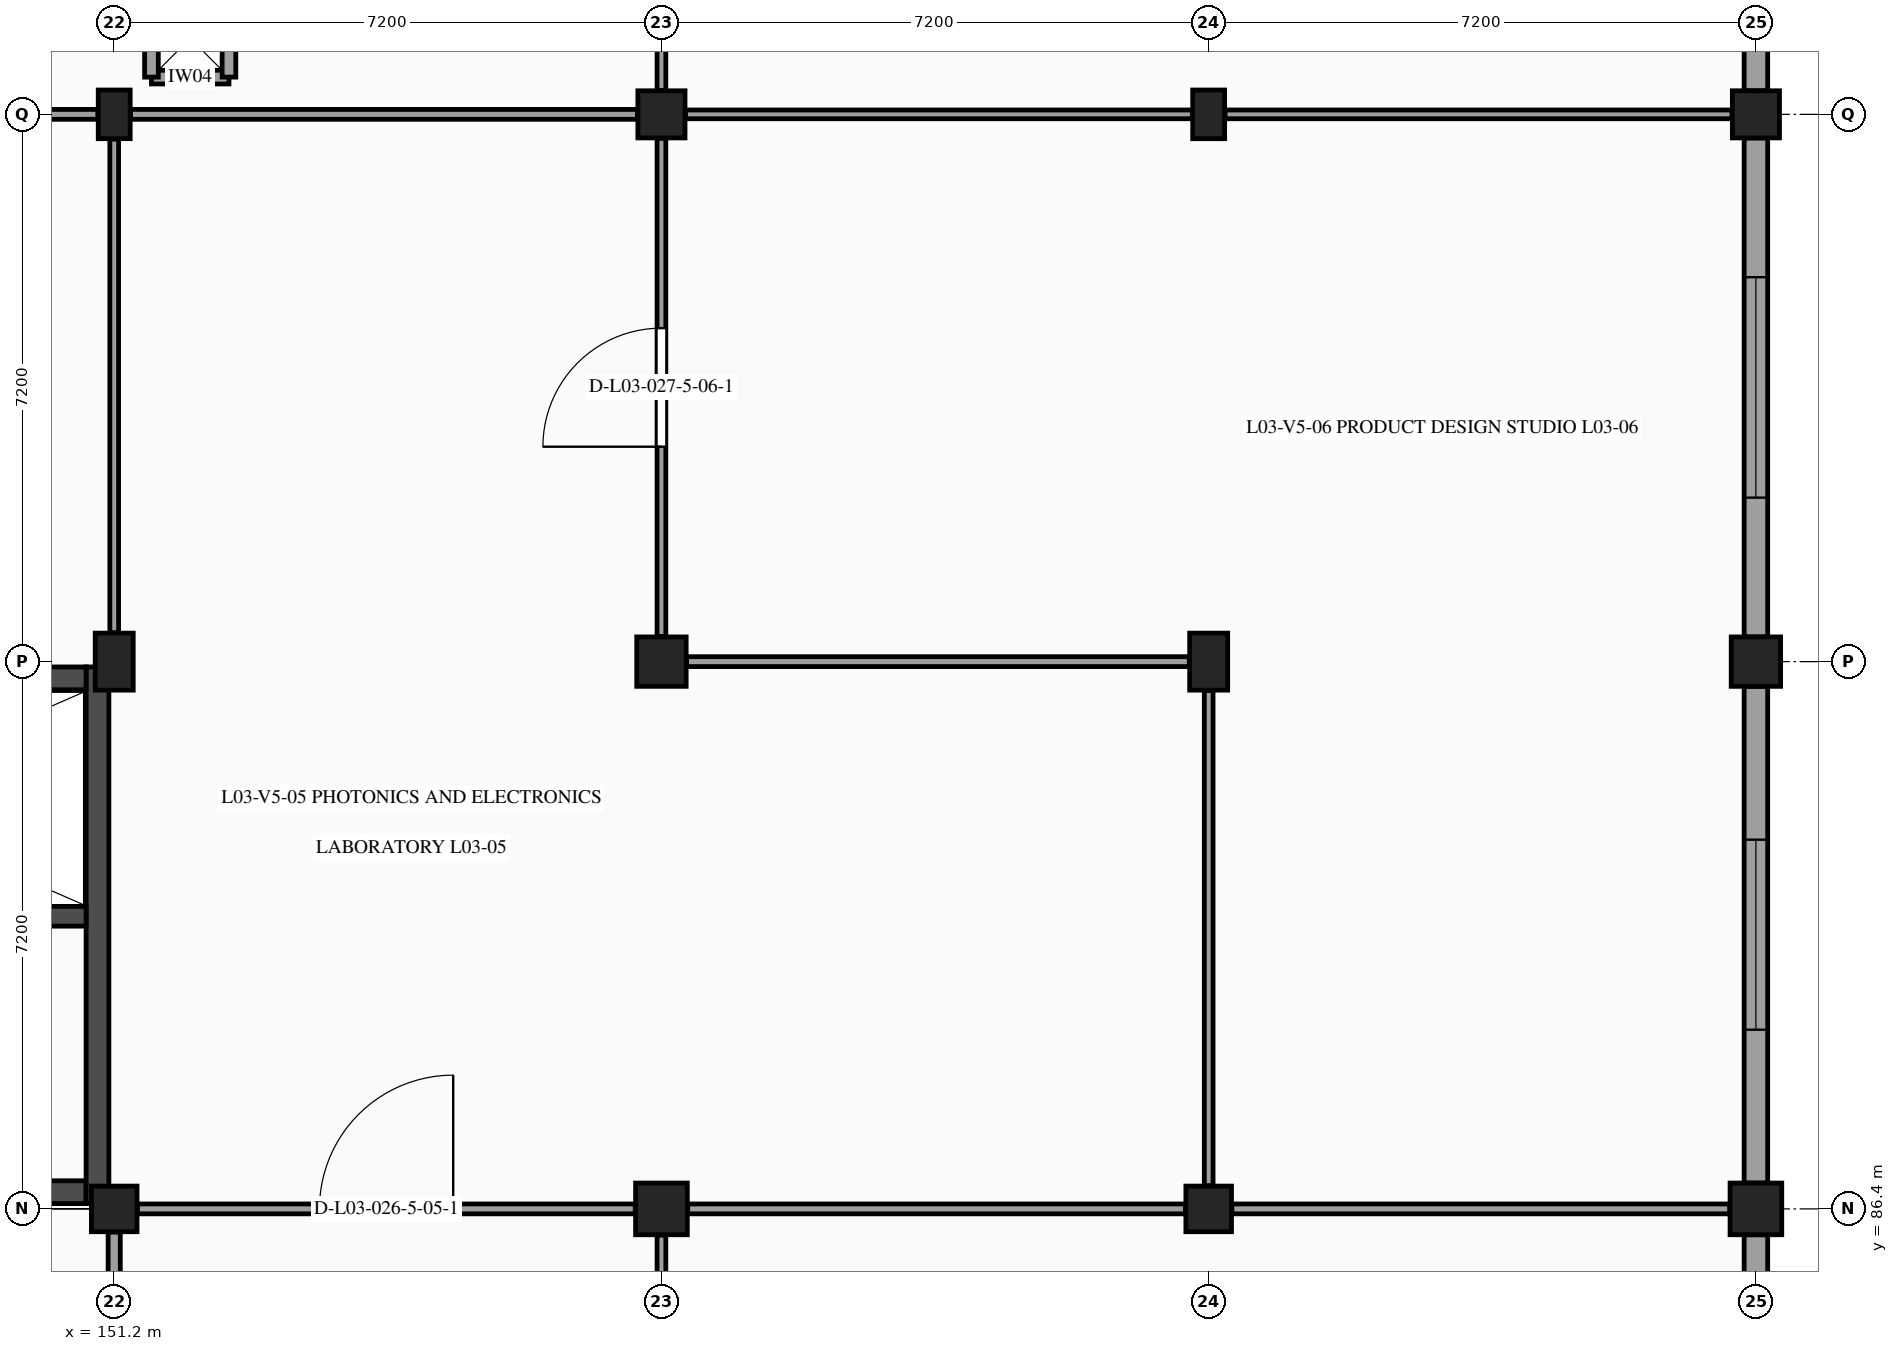
"""IFC4 building model, lengths in metres.
Left out: names, types, materials, properties, quantities, classifications, styles, units other than length and angle.
Written with IfcOpenShell. Run it as: python <this file> out.ifc"""

import sys

from ifc_helpers import new_model, si_unit, direction, frame, frame_2d, origin, origin_2d, place, context, subcontext, project, spatial, rectangle, extrude, element, fill, save


model = new_model("IFC4")
c1 = context("Model", 3, precision=1e-05, world=origin(), true_north=direction((0.0, 1.0)))
c2 = subcontext(c1, "Body", "Model", "MODEL_VIEW")
j1 = project(units=[si_unit("LENGTHUNIT", "METRE"), si_unit("PLANEANGLEUNIT", "RADIAN")], contexts=[c1])
p1 = place(None, origin())
s1 = spatial("IfcSite", under=j1, at=p1, CompositionType="ELEMENT")
p2 = place(p1, origin())
s2 = spatial("IfcBuilding", under=s1, at=p2, CompositionType="ELEMENT")
p3 = place(p2, frame((0.0, 0.0, 14.4)))
s3 = spatial("IfcBuildingStorey", under=s2, at=p3, CompositionType="ELEMENT", Elevation=14.4)
p4 = place(p3, frame((151.2, 86.4, 0.0), z_axis=(0.0, 0.0, 1.0), x_axis=(1.0, 0.0, 0.0)))
e1 = element("IfcColumn", 1, at=p4, inside=s3, PredefinedType="COLUMN", context=c2, shape_type="SweptSolid", body=[
    extrude(rectangle(XDim=0.6, YDim=0.6, at=origin_2d()), origin(), (0.0, 0.0, 1.0), 4.2),
])
p5 = place(p3, frame((151.2, 93.6, 0.0), z_axis=(0.0, 0.0, 1.0), x_axis=(1.0, 0.0, 0.0)))
e2 = element("IfcColumn", 2, at=p5, inside=s3, PredefinedType="COLUMN", context=c2, shape_type="SweptSolid", body=[
    extrude(rectangle(XDim=0.5, YDim=0.75, at=origin_2d()), origin(), (0.0, 0.0, 1.0), 4.2),
])
p6 = place(p3, frame((151.2, 100.8, 0.0), z_axis=(0.0, 0.0, 1.0), x_axis=(1.0, 0.0, 0.0)))
e3 = element("IfcColumn", 3, at=p6, inside=s3, PredefinedType="PILASTER", context=c2, shape_type="SweptSolid", body=[
    extrude(rectangle(XDim=0.42, YDim=0.64, at=origin_2d()), origin(), (0.0, 0.0, 1.0), 4.2),
])
p7 = place(p3, frame((158.4, 86.4, 0.0), z_axis=(0.0, 0.0, 1.0), x_axis=(1.0, 0.0, 0.0)))
e4 = element("IfcColumn", 4, at=p7, inside=s3, PredefinedType="COLUMN", context=c2, shape_type="SweptSolid", body=[
    extrude(rectangle(XDim=0.68, YDim=0.68, at=origin_2d()), origin(), (0.0, 0.0, 1.0), 4.2),
])
p8 = place(p3, frame((158.4, 93.6, 0.0), z_axis=(0.0, 0.0, 1.0), x_axis=(1.0, 0.0, 0.0)))
e5 = element("IfcColumn", 5, at=p8, inside=s3, PredefinedType="COLUMN", context=c2, shape_type="SweptSolid", body=[
    extrude(rectangle(XDim=0.65, YDim=0.65, at=origin_2d()), origin(), (0.0, 0.0, 1.0), 4.2),
])
p9 = place(p3, frame((158.4, 100.8, 0.0), z_axis=(0.0, 0.0, 1.0), x_axis=(1.0, 0.0, 0.0)))
e6 = element("IfcColumn", 6, at=p9, inside=s3, PredefinedType="COLUMN", context=c2, shape_type="SweptSolid", body=[
    extrude(rectangle(XDim=0.62, YDim=0.62, at=origin_2d()), origin(), (0.0, 0.0, 1.0), 4.2),
])
p10 = place(p3, frame((165.6, 86.4, 0.0), z_axis=(0.0, 0.0, 1.0), x_axis=(1.0, 0.0, 0.0)))
e7 = element("IfcColumn", 7, at=p10, inside=s3, PredefinedType="COLUMN", context=c2, shape_type="SweptSolid", body=[
    extrude(rectangle(XDim=0.6, YDim=0.6, at=origin_2d()), origin(), (0.0, 0.0, 1.0), 4.2),
])
p11 = place(p3, frame((165.6, 93.6, 0.0), z_axis=(0.0, 0.0, 1.0), x_axis=(1.0, 0.0, 0.0)))
e8 = element("IfcColumn", 8, at=p11, inside=s3, PredefinedType="COLUMN", context=c2, shape_type="SweptSolid", body=[
    extrude(rectangle(XDim=0.5, YDim=0.75, at=origin_2d()), origin(), (0.0, 0.0, 1.0), 4.2),
])
p12 = place(p3, frame((165.6, 100.8, 0.0), z_axis=(0.0, 0.0, 1.0), x_axis=(1.0, 0.0, 0.0)))
e9 = element("IfcColumn", 9, at=p12, inside=s3, PredefinedType="PILASTER", context=c2, shape_type="SweptSolid", body=[
    extrude(rectangle(XDim=0.42, YDim=0.64, at=origin_2d()), origin(), (0.0, 0.0, 1.0), 4.2),
])
p13 = place(p3, frame((172.8, 86.4, 0.0), z_axis=(0.0, 0.0, 1.0), x_axis=(1.0, 0.0, 0.0)))
e10 = element("IfcColumn", 10, at=p13, inside=s3, PredefinedType="COLUMN", context=c2, shape_type="SweptSolid", body=[
    extrude(rectangle(XDim=0.68, YDim=0.68, at=origin_2d()), origin(), (0.0, 0.0, 1.0), 4.2),
])
p14 = place(p3, frame((172.8, 93.6, 0.0), z_axis=(0.0, 0.0, 1.0), x_axis=(1.0, 0.0, 0.0)))
e11 = element("IfcColumn", 11, at=p14, inside=s3, PredefinedType="COLUMN", context=c2, shape_type="SweptSolid", body=[
    extrude(rectangle(XDim=0.65, YDim=0.65, at=origin_2d()), origin(), (0.0, 0.0, 1.0), 4.2),
])
p15 = place(p3, frame((172.8, 100.8, 0.0), z_axis=(0.0, 0.0, 1.0), x_axis=(1.0, 0.0, 0.0)))
e12 = element("IfcColumn", 12, at=p15, inside=s3, PredefinedType="COLUMN", context=c2, shape_type="SweptSolid", body=[
    extrude(rectangle(XDim=0.62, YDim=0.62, at=origin_2d()), origin(), (0.0, 0.0, 1.0), 4.2),
])
p16 = place(p3, frame((172.8, 107.7, 0.0), z_axis=(0.0, 0.0, 1.0), x_axis=(0.0, -1.0, 0.0)))
e13 = element("IfcWall", 13, at=p16, inside=s3, PredefinedType="STANDARD", context=c2, shape_type="SweptSolid", body=[
    extrude(rectangle(XDim=6.59, YDim=0.31, at=frame_2d((3.295, 0.0))), origin(), (0.0, 0.0, 1.0), 3.135),
])
p17 = place(p16, frame((1.395, 0.0, 0.98)))
e14 = element("IfcOpeningElement", 14, at=p17, cuts=e13, PredefinedType="OPENING", context=c2, shape_type="SweptSolid", body=[
    extrude(rectangle(XDim=3.8, YDim=1.6, at=frame_2d((1.9, 0.8))), frame((0.0, 0.165, 0.0), z_axis=(0.0, -1.0, 0.0), x_axis=(1.0, 0.0, 0.0)), (0.0, 0.0, 1.0), 0.33),
])
p18 = place(p3, frame((172.8, 100.49, 0.0), z_axis=(0.0, 0.0, 1.0), x_axis=(0.0, -1.0, 0.0)))
e15 = element("IfcWall", 15, at=p18, inside=s3, PredefinedType="STANDARD", context=c2, shape_type="SweptSolid", body=[
    extrude(rectangle(XDim=6.565, YDim=0.31, at=frame_2d((3.282, 0.0))), origin(), (0.0, 0.0, 1.0), 3.135),
])
p19 = place(p18, frame((1.833, 0.0, 0.98)))
e16 = element("IfcOpeningElement", 16, at=p19, cuts=e15, PredefinedType="OPENING", context=c2, shape_type="SweptSolid", body=[
    extrude(rectangle(XDim=2.9, YDim=1.6, at=frame_2d((1.45, 0.8))), frame((0.0, 0.165, 0.0), z_axis=(0.0, -1.0, 0.0), x_axis=(1.0, 0.0, 0.0)), (0.0, 0.0, 1.0), 0.33),
])
p20 = place(p3, frame((172.8, 93.275, 0.0), z_axis=(0.0, 0.0, 1.0), x_axis=(0.0, -1.0, 0.0)))
e17 = element("IfcWall", 17, at=p20, inside=s3, PredefinedType="STANDARD", context=c2, shape_type="SweptSolid", body=[
    extrude(rectangle(XDim=6.535, YDim=0.31, at=frame_2d((3.268, 0.0))), origin(), (0.0, 0.0, 1.0), 3.135),
])
p21 = place(p20, frame((2.018, 0.0, 0.98)))
e18 = element("IfcOpeningElement", 18, at=p21, cuts=e17, PredefinedType="OPENING", context=c2, shape_type="SweptSolid", body=[
    extrude(rectangle(XDim=2.5, YDim=1.35, at=frame_2d((1.25, 0.675))), frame((0.0, 0.165, 0.0), z_axis=(0.0, -1.0, 0.0), x_axis=(1.0, 0.0, 0.0)), (0.0, 0.0, 1.0), 0.33),
])
p22 = place(p3, frame((172.8, 86.06, 0.0), z_axis=(0.0, 0.0, 1.0), x_axis=(0.0, -1.0, 0.0)))
e19 = element("IfcWall", 19, at=p22, inside=s3, PredefinedType="STANDARD", context=c2, shape_type="SweptSolid", body=[
    extrude(rectangle(XDim=6.54, YDim=0.31, at=frame_2d((3.27, 0.0))), origin(), (0.0, 0.0, 1.0), 3.135),
])
p23 = place(p22, frame((2.22, 0.0, 0.98)))
e20 = element("IfcOpeningElement", 20, at=p23, cuts=e19, PredefinedType="OPENING", context=c2, shape_type="SweptSolid", body=[
    extrude(rectangle(XDim=2.1, YDim=1.3, at=frame_2d((1.05, 0.65))), frame((0.0, 0.165, 0.0), z_axis=(0.0, -1.0, 0.0), x_axis=(1.0, 0.0, 0.0)), (0.0, 0.0, 1.0), 0.33),
])
p24 = place(p3, frame((144.15, 86.62, 0.0), z_axis=(0.0, 0.0, 1.0), x_axis=(1.0, 0.0, 0.0)))
e21 = element("IfcWall", 21, at=p24, inside=s3, PredefinedType="SHEAR", context=c2, shape_type="SweptSolid", body=[
    extrude(rectangle(XDim=6.68, YDim=0.3, at=frame_2d((3.34, 0.0))), origin(), (0.0, 0.0, 1.0), 3.94),
])
p25 = place(p24, frame((2.22, 0.0, 0.0)))
e22 = element("IfcOpeningElement", 22, at=p25, cuts=e21, PredefinedType="OPENING", context=c2, shape_type="SweptSolid", body=[
    extrude(rectangle(XDim=1.8, YDim=2.2, at=frame_2d((0.9, 1.1))), frame((0.0, 0.16, 0.0), z_axis=(0.0, -1.0, 0.0), x_axis=(1.0, 0.0, 0.0)), (0.0, 0.0, 1.0), 0.32),
])
p26 = place(p3, frame((150.98, 86.47, 0.0), z_axis=(0.0, 0.0, 1.0), x_axis=(0.0, 1.0, 0.0)))
e23 = element("IfcWall", 23, at=p26, inside=s3, PredefinedType="SHEAR", context=c2, shape_type="SweptSolid", body=[
    extrude(rectangle(XDim=7.06, YDim=0.3, at=frame_2d((3.53, 0.0))), origin(), (0.0, 0.0, 1.0), 3.94),
])
p27 = place(p3, frame((144.15, 93.38, 0.0), z_axis=(0.0, 0.0, 1.0), x_axis=(1.0, 0.0, 0.0)))
e24 = element("IfcWall", 24, at=p27, inside=s3, PredefinedType="SHEAR", context=c2, shape_type="SweptSolid", body=[
    extrude(rectangle(XDim=6.68, YDim=0.3, at=frame_2d((3.34, 0.0))), origin(), (0.0, 0.0, 1.0), 3.94),
])
p28 = place(p3, frame((144.15, 90.25, 0.0), z_axis=(0.0, 0.0, 1.0), x_axis=(1.0, 0.0, 0.0)))
e25 = element("IfcWall", 25, at=p28, inside=s3, PredefinedType="SHEAR", context=c2, shape_type="SweptSolid", body=[
    extrude(rectangle(XDim=6.68, YDim=0.26, at=frame_2d((3.34, 0.0))), origin(), (0.0, 0.0, 1.0), 3.94),
])
p29 = place(p28, frame((0.95, 0.0, 0.0)))
e26 = element("IfcOpeningElement", 26, at=p29, cuts=e25, PredefinedType="OPENING", context=c2, shape_type="SweptSolid", body=[
    extrude(rectangle(XDim=1.1, YDim=2.2, at=frame_2d((0.55, 1.1))), frame((0.0, 0.14, 0.0), z_axis=(0.0, -1.0, 0.0), x_axis=(1.0, 0.0, 0.0)), (0.0, 0.0, 1.0), 0.28),
])
p30 = place(p28, frame((4.1, 0.0, 0.0)))
e27 = element("IfcOpeningElement", 27, at=p30, cuts=e25, PredefinedType="OPENING", context=c2, shape_type="SweptSolid", body=[
    extrude(rectangle(XDim=1.4, YDim=2.3, at=frame_2d((0.7, 1.15))), frame((0.0, 0.14, 0.0), z_axis=(0.0, -1.0, 0.0), x_axis=(1.0, 0.0, 0.0)), (0.0, 0.0, 1.0), 0.28),
])
for number, where, z_axis, x_axis in (
    (28, (151.69, 101.29, 0.0), (0.0, 0.0, 1.0), (1.0, 0.0, 0.0)),
    (29, (152.71, 101.29, 0.0), (0.0, 0.0, 1.0), (0.0, 1.0, 0.0)),
    (30, (151.69, 102.31, 0.0), (0.0, 0.0, 1.0), (0.0, -1.0, 0.0)),
):
    element("IfcWall", number, at=place(p3, frame(where, z_axis=z_axis, x_axis=x_axis)), inside=s3, PredefinedType="PARTITIONING", context=c2, shape_type="SweptSolid", body=[
        extrude(rectangle(XDim=1.02, YDim=0.18, at=frame_2d((0.51, 0.0))), origin(), (0.0, 0.0, 1.0), 3.94),
    ])
p31 = place(p3, frame((151.2, 79.515, 0.0), z_axis=(0.0, 0.0, 1.0), x_axis=(0.0, 1.0, 0.0)))
e31 = element("IfcWall", 31, at=p31, inside=s3, PredefinedType="PARTITIONING", context=c2, shape_type="SweptSolid", body=[
    extrude(rectangle(XDim=6.58, YDim=0.16, at=frame_2d((3.29, 0.0))), origin(), (0.0, 0.0, 1.0), 3.305),
])
p32 = place(p3, frame((151.2, 93.98, 0.0), z_axis=(0.0, 0.0, 1.0), x_axis=(0.0, 1.0, 0.0)))
e32 = element("IfcWall", 32, at=p32, inside=s3, PredefinedType="PARTITIONING", context=c2, shape_type="SweptSolid", body=[
    extrude(rectangle(XDim=6.495, YDim=0.115, at=frame_2d((3.248, 0.0))), origin(), (0.0, 0.0, 1.0), 3.255),
])
p33 = place(p3, frame((144.315, 100.8, 0.0), z_axis=(0.0, 0.0, 1.0), x_axis=(1.0, 0.0, 0.0)))
e33 = element("IfcWall", 33, at=p33, inside=s3, PredefinedType="PARTITIONING", context=c2, shape_type="SweptSolid", body=[
    extrude(rectangle(XDim=6.67, YDim=0.13, at=frame_2d((3.335, 0.0))), origin(), (0.0, 0.0, 1.0), 3.215),
])
p34 = place(p3, frame((158.4, 79.525, 0.0), z_axis=(0.0, 0.0, 1.0), x_axis=(0.0, 1.0, 0.0)))
e34 = element("IfcWall", 34, at=p34, inside=s3, PredefinedType="PARTITIONING", context=c2, shape_type="SweptSolid", body=[
    extrude(rectangle(XDim=6.53, YDim=0.115, at=frame_2d((3.265, 0.0))), origin(), (0.0, 0.0, 1.0), 3.305),
])
p35 = place(p34, frame((2.305, 0.0, 0.0)))
e35 = element("IfcOpeningElement", 35, at=p35, cuts=e34, PredefinedType="OPENING", context=c2, shape_type="SweptSolid", body=[
    extrude(rectangle(XDim=1.92, YDim=2.35, at=frame_2d((0.96, 1.175))), frame((0.0, 0.067, 0.0), z_axis=(0.0, -1.0, 0.0), x_axis=(1.0, 0.0, 0.0)), (0.0, 0.0, 1.0), 0.135),
])
p36 = place(p3, frame((151.505, 86.4, 0.0), z_axis=(0.0, 0.0, 1.0), x_axis=(1.0, 0.0, 0.0)))
e36 = element("IfcWall", 36, at=p36, inside=s3, PredefinedType="PARTITIONING", context=c2, shape_type="SweptSolid", body=[
    extrude(rectangle(XDim=6.55, YDim=0.13, at=frame_2d((3.275, 0.0))), origin(), (0.0, 0.0, 1.0), 3.22),
])
p37 = place(p36, frame((2.395, 0.0, 0.0)))
e37 = element("IfcOpeningElement", 37, at=p37, cuts=e36, PredefinedType="OPENING", context=c2, shape_type="SweptSolid", body=[
    extrude(rectangle(XDim=1.76, YDim=2.3, at=frame_2d((0.88, 1.15))), frame((0.0, 0.075, 0.0), z_axis=(0.0, -1.0, 0.0), x_axis=(1.0, 0.0, 0.0)), (0.0, 0.0, 1.0), 0.15),
])
p38 = place(p3, frame((158.4, 93.93, 0.0), z_axis=(0.0, 0.0, 1.0), x_axis=(0.0, 1.0, 0.0)))
e38 = element("IfcWall", 38, at=p38, inside=s3, PredefinedType="PARTITIONING", context=c2, shape_type="SweptSolid", body=[
    extrude(rectangle(XDim=6.555, YDim=0.115, at=frame_2d((3.278, 0.0))), origin(), (0.0, 0.0, 1.0), 3.255),
])
p39 = place(p38, frame((2.498, 0.0, 0.0)))
e39 = element("IfcOpeningElement", 39, at=p39, cuts=e38, PredefinedType="OPENING", context=c2, shape_type="SweptSolid", body=[
    extrude(rectangle(XDim=1.56, YDim=2.25, at=frame_2d((0.78, 1.125))), frame((0.0, 0.067, 0.0), z_axis=(0.0, -1.0, 0.0), x_axis=(1.0, 0.0, 0.0)), (0.0, 0.0, 1.0), 0.135),
])
p40 = place(p3, frame((151.415, 100.8, 0.0), z_axis=(0.0, 0.0, 1.0), x_axis=(1.0, 0.0, 0.0)))
e40 = element("IfcWall", 40, at=p40, inside=s3, PredefinedType="PARTITIONING", context=c2, shape_type="SweptSolid", body=[
    extrude(rectangle(XDim=6.67, YDim=0.13, at=frame_2d((3.335, 0.0))), origin(), (0.0, 0.0, 1.0), 3.22),
])
p41 = place(p3, frame((158.4, 101.115, 0.0), z_axis=(0.0, 0.0, 1.0), x_axis=(0.0, 1.0, 0.0)))
e41 = element("IfcWall", 41, at=p41, inside=s3, PredefinedType="PARTITIONING", context=c2, shape_type="SweptSolid", body=[
    extrude(rectangle(XDim=6.58, YDim=0.115, at=frame_2d((3.29, 0.0))), origin(), (0.0, 0.0, 1.0), 3.25),
])
p42 = place(p41, frame((2.55, 0.0, 0.0)))
e42 = element("IfcOpeningElement", 42, at=p42, cuts=e41, PredefinedType="OPENING", context=c2, shape_type="SweptSolid", body=[
    extrude(rectangle(XDim=1.48, YDim=2.28, at=frame_2d((0.74, 1.14))), frame((0.0, 0.067, 0.0), z_axis=(0.0, -1.0, 0.0), x_axis=(1.0, 0.0, 0.0)), (0.0, 0.0, 1.0), 0.135),
])
p43 = place(p3, frame((158.745, 86.4, 0.0), z_axis=(0.0, 0.0, 1.0), x_axis=(1.0, 0.0, 0.0)))
e43 = element("IfcWall", 43, at=p43, inside=s3, PredefinedType="PARTITIONING", context=c2, shape_type="SweptSolid", body=[
    extrude(rectangle(XDim=6.55, YDim=0.13, at=frame_2d((3.275, 0.0))), origin(), (0.0, 0.0, 1.0), 3.24),
])
p44 = place(p3, frame((165.6, 86.705, 0.0), z_axis=(0.0, 0.0, 1.0), x_axis=(0.0, 1.0, 0.0)))
e44 = element("IfcWall", 44, at=p44, inside=s3, PredefinedType="PARTITIONING", context=c2, shape_type="SweptSolid", body=[
    extrude(rectangle(XDim=6.515, YDim=0.115, at=frame_2d((3.257, 0.0))), origin(), (0.0, 0.0, 1.0), 3.255),
])
p45 = place(p3, frame((158.73, 93.6, 0.0), z_axis=(0.0, 0.0, 1.0), x_axis=(1.0, 0.0, 0.0)))
e45 = element("IfcWall", 45, at=p45, inside=s3, PredefinedType="PARTITIONING", context=c2, shape_type="SweptSolid", body=[
    extrude(rectangle(XDim=6.615, YDim=0.13, at=frame_2d((3.308, 0.0))), origin(), (0.0, 0.0, 1.0), 3.24),
])
p46 = place(p3, frame((158.715, 100.8, 0.0), z_axis=(0.0, 0.0, 1.0), x_axis=(1.0, 0.0, 0.0)))
e46 = element("IfcWall", 46, at=p46, inside=s3, PredefinedType="PARTITIONING", context=c2, shape_type="SweptSolid", body=[
    extrude(rectangle(XDim=6.67, YDim=0.115, at=frame_2d((3.335, 0.0))), origin(), (0.0, 0.0, 1.0), 3.24),
])
p47 = place(p3, frame((165.905, 86.4, 0.0), z_axis=(0.0, 0.0, 1.0), x_axis=(1.0, 0.0, 0.0)))
e47 = element("IfcWall", 47, at=p47, inside=s3, PredefinedType="PARTITIONING", context=c2, shape_type="SweptSolid", body=[
    extrude(rectangle(XDim=6.55, YDim=0.13, at=frame_2d((3.275, 0.0))), origin(), (0.0, 0.0, 1.0), 3.28),
])
p48 = place(p3, frame((165.815, 100.8, 0.0), z_axis=(0.0, 0.0, 1.0), x_axis=(1.0, 0.0, 0.0)))
e48 = element("IfcWall", 48, at=p48, inside=s3, PredefinedType="PARTITIONING", context=c2, shape_type="SweptSolid", body=[
    extrude(rectangle(XDim=6.67, YDim=0.115, at=frame_2d((3.335, 0.0))), origin(), (0.0, 0.0, 1.0), 3.28),
])
p49 = place(p19, origin())
e49 = element("IfcWindow", 49, at=p49, inside=s3, PartitioningType="SINGLE_PANEL", PredefinedType="WINDOW", context=c2, shape_type="SweptSolid", body=[
    extrude(rectangle(XDim=2.9, YDim=1.6, at=frame_2d((1.45, 0.8))), frame((0.0, -0.03, 0.0), z_axis=(0.0, -1.0, 0.0), x_axis=(1.0, 0.0, 0.0)), (0.0, 0.0, 1.0), 0.06),
])
fill(e16, e49)
p50 = place(p21, origin())
e50 = element("IfcWindow", 50, at=p50, inside=s3, PartitioningType="SINGLE_PANEL", PredefinedType="WINDOW", context=c2, shape_type="SweptSolid", body=[
    extrude(rectangle(XDim=2.5, YDim=1.35, at=frame_2d((1.25, 0.675))), frame((0.0, -0.03, 0.0), z_axis=(0.0, -1.0, 0.0), x_axis=(1.0, 0.0, 0.0)), (0.0, 0.0, 1.0), 0.06),
])
fill(e18, e50)
p51 = place(p37, origin())
e51 = element("IfcDoor", 51, at=p51, inside=s3, OperationType="SINGLE_SWING_RIGHT", PredefinedType="DOOR", context=c2, shape_type="SweptSolid", body=[
    extrude(rectangle(XDim=1.76, YDim=2.3, at=frame_2d((0.88, 1.15))), frame((0.0, 0.025, 0.0), z_axis=(0.0, -1.0, 0.0), x_axis=(1.0, 0.0, 0.0)), (0.0, 0.0, 1.0), 0.05),
])
fill(e37, e51)
p52 = place(p39, origin())
e52 = element("IfcDoor", 52, at=p52, inside=s3, OperationType="SINGLE_SWING_LEFT", PredefinedType="DOOR", context=c2, shape_type="SweptSolid", body=[
    extrude(rectangle(XDim=1.56, YDim=2.25, at=frame_2d((0.78, 1.125))), frame((0.0, 0.025, 0.0), z_axis=(0.0, -1.0, 0.0), x_axis=(1.0, 0.0, 0.0)), (0.0, 0.0, 1.0), 0.05),
])
fill(e39, e52)
save(model, sys.argv[1])
